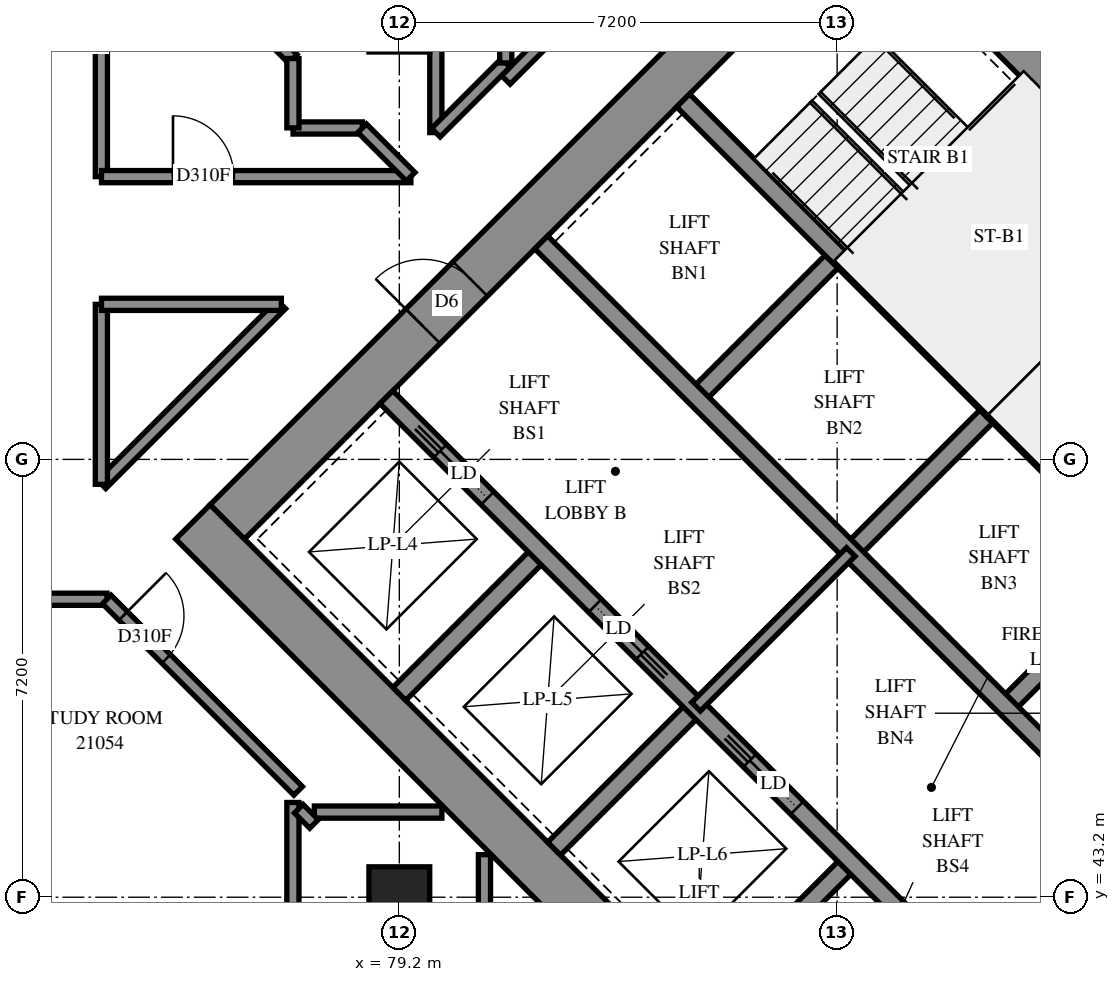
"""IFC4 building model, lengths in metres.
Left out: names, types, materials, properties, quantities, classifications, styles, units other than length and angle.
Written with IfcOpenShell. Run it as: python <this file> out.ifc"""

import sys

from ifc_helpers import new_model, si_unit, direction, frame, frame_2d, origin, origin_2d, place, context, subcontext, project, spatial, rectangle, extrude, element, fill, save


model = new_model("IFC4")
c1 = context("Model", 3, precision=1e-05, world=origin(), true_north=direction((0.0, 1.0)))
c2 = subcontext(c1, "Body", "Model", "MODEL_VIEW")
j1 = project(units=[si_unit("LENGTHUNIT", "METRE"), si_unit("PLANEANGLEUNIT", "RADIAN")], contexts=[c1])
p1 = place(None, origin())
s1 = spatial("IfcSite", under=j1, at=p1, CompositionType="ELEMENT")
p2 = place(p1, origin())
s2 = spatial("IfcBuilding", under=s1, at=p2, CompositionType="ELEMENT")
p3 = place(p2, frame((0.0, 0.0, 81.2)))
s3 = spatial("IfcBuildingStorey", under=s2, at=p3, CompositionType="ELEMENT", Elevation=81.2)
p4 = place(p3, frame((79.2, 43.2, 0.0), z_axis=(0.0, 0.0, 1.0), x_axis=(1.0, 0.0, 0.0)))
e1 = element("IfcColumn", 1, at=p4, inside=s3, PredefinedType="COLUMN", context=c2, shape_type="SweptSolid", body=[
    extrude(rectangle(XDim=1.0, YDim=1.0, at=origin_2d()), origin(), (0.0, 0.0, 1.0), 3.1),
])
p5 = place(p3, frame((75.806, 49.373, -0.3), z_axis=(0.0, 0.0, 1.0), x_axis=(0.7071067812, -0.7071067812, 0.0)))
e2 = element("IfcWall", 2, at=p5, inside=s3, PredefinedType="SHEAR", context=c2, shape_type="SweptSolid", body=[
    extrude(rectangle(XDim=16.0, YDim=0.8, at=frame_2d((8.0, 0.0))), origin(), (0.0, 0.0, 1.0), 2.7),
])
p6 = place(p3, frame((86.554, 60.121, -0.3), z_axis=(0.0, 0.0, 1.0), x_axis=(0.7071067812, -0.7071067812, 0.0)))
e3 = element("IfcWall", 3, at=p6, inside=s3, PredefinedType="SHEAR", context=c2, shape_type="SweptSolid", body=[
    extrude(rectangle(XDim=16.0, YDim=0.8, at=frame_2d((8.0, 0.0))), origin(), (0.0, 0.0, 1.0), 2.7),
])
p7 = place(p6, frame((10.8, 0.0, 0.3)))
e4 = element("IfcOpeningElement", 4, at=p7, cuts=e3, PredefinedType="OPENING", context=c2, shape_type="SweptSolid", body=[
    extrude(rectangle(XDim=0.8, YDim=2.1, at=frame_2d((0.4, 1.05))), frame((0.0, 0.41, 0.0), z_axis=(0.0, -1.0, 0.0), x_axis=(1.0, 0.0, 0.0)), (0.0, 0.0, 1.0), 0.82),
])
p8 = place(p3, frame((76.372, 49.373, -0.3), z_axis=(0.0, 0.0, 1.0), x_axis=(0.7071067812, 0.7071067812, 0.0)))
e5 = element("IfcWall", 5, at=p8, inside=s3, PredefinedType="SHEAR", context=c2, shape_type="SweptSolid", body=[
    extrude(rectangle(XDim=14.4, YDim=0.8, at=frame_2d((7.2, 0.0))), origin(), (0.0, 0.0, 1.0), 2.7),
])
p9 = place(p8, frame((4.55, 0.0, 0.3)))
e6 = element("IfcOpeningElement", 6, at=p9, cuts=e5, PredefinedType="OPENING", context=c2, shape_type="SweptSolid", body=[
    extrude(rectangle(XDim=1.1, YDim=2.1, at=frame_2d((0.55, 1.05))), frame((0.0, 0.41, 0.0), z_axis=(0.0, -1.0, 0.0), x_axis=(1.0, 0.0, 0.0)), (0.0, 0.0, 1.0), 0.82),
])
p10 = place(p8, frame((11.35, 0.0, 0.3)))
e7 = element("IfcOpeningElement", 7, at=p10, cuts=e5, PredefinedType="OPENING", context=c2, shape_type="SweptSolid", body=[
    extrude(rectangle(XDim=1.1, YDim=2.1, at=frame_2d((0.55, 1.05))), frame((0.0, 0.41, 0.0), z_axis=(0.0, -1.0, 0.0), x_axis=(1.0, 0.0, 0.0)), (0.0, 0.0, 1.0), 0.82),
])
p11 = place(p3, frame((87.12, 38.625, -0.3), z_axis=(0.0, 0.0, 1.0), x_axis=(0.7071067812, 0.7071067812, 0.0)))
e8 = element("IfcWall", 8, at=p11, inside=s3, PredefinedType="SHEAR", context=c2, shape_type="SweptSolid", body=[
    extrude(rectangle(XDim=14.4, YDim=0.8, at=frame_2d((7.2, 0.0))), origin(), (0.0, 0.0, 1.0), 2.7),
])
p12 = place(p11, frame((4.55, 0.0, 0.3)))
e9 = element("IfcOpeningElement", 9, at=p12, cuts=e8, PredefinedType="OPENING", context=c2, shape_type="SweptSolid", body=[
    extrude(rectangle(XDim=1.1, YDim=2.1, at=frame_2d((0.55, 1.05))), frame((0.0, 0.41, 0.0), z_axis=(0.0, -1.0, 0.0), x_axis=(1.0, 0.0, 0.0)), (0.0, 0.0, 1.0), 0.82),
])
p13 = place(p11, frame((11.35, 0.0, 0.3)))
e10 = element("IfcOpeningElement", 10, at=p13, cuts=e8, PredefinedType="OPENING", context=c2, shape_type="SweptSolid", body=[
    extrude(rectangle(XDim=1.1, YDim=2.1, at=frame_2d((0.55, 1.05))), frame((0.0, 0.41, 0.0), z_axis=(0.0, -1.0, 0.0), x_axis=(1.0, 0.0, 0.0)), (0.0, 0.0, 1.0), 0.82),
])
for number, where, z_axis, x_axis in (
    (11, (79.2, 46.544, 0.0), (0.0, 0.0, 1.0), (0.707, 0.707, 0.0)),
    (12, (84.079, 51.423, 0.0), (0.0, 0.0, 1.0), (0.707, 0.707, 0.0)),
):
    element("IfcWall", number, at=place(p3, frame(where, z_axis=z_axis, x_axis=x_axis)), inside=s3, PredefinedType="SOLIDWALL", context=c2, shape_type="SweptSolid", body=[
        extrude(rectangle(XDim=3.3, YDim=0.3, at=frame_2d((1.65, 0.0))), origin(), (0.0, 0.0, 1.0), 3.1),
    ])
p14 = place(p3, frame((81.746, 43.999, 0.0), z_axis=(0.0, 0.0, 1.0), x_axis=(0.7071067812, 0.7071067812, 0.0)))
e13 = element("IfcWall", 13, at=p14, inside=s3, PredefinedType="SOLIDWALL", context=c2, shape_type="SweptSolid", body=[
    extrude(rectangle(XDim=3.3, YDim=0.3, at=frame_2d((1.65, 0.0))), origin(), (0.0, 0.0, 1.0), 3.1),
])
p15 = place(p3, frame((86.625, 48.878, 0.0), z_axis=(0.0, 0.0, 1.0), x_axis=(0.7071067812, 0.7071067812, 0.0)))
e14 = element("IfcWall", 14, at=p15, inside=s3, PredefinedType="SOLIDWALL", context=c2, shape_type="SweptSolid", body=[
    extrude(rectangle(XDim=3.3, YDim=0.3, at=frame_2d((1.65, 0.0))), origin(), (0.0, 0.0, 1.0), 3.1),
])
p16 = place(p3, frame((84.291, 41.453, 0.0), z_axis=(0.0, 0.0, 1.0), x_axis=(0.7071067812, 0.7071067812, 0.0)))
e15 = element("IfcWall", 15, at=p16, inside=s3, PredefinedType="SOLIDWALL", context=c2, shape_type="SweptSolid", body=[
    extrude(rectangle(XDim=3.3, YDim=0.3, at=frame_2d((1.65, 0.0))), origin(), (0.0, 0.0, 1.0), 3.1),
])
p17 = place(p3, frame((89.17, 46.332, 0.0), z_axis=(0.0, 0.0, 1.0), x_axis=(0.7071067812, 0.7071067812, 0.0)))
e16 = element("IfcWall", 16, at=p17, inside=s3, PredefinedType="SOLIDWALL", context=c2, shape_type="SweptSolid", body=[
    extrude(rectangle(XDim=3.3, YDim=0.3, at=frame_2d((1.65, 0.0))), origin(), (0.0, 0.0, 1.0), 3.1),
])
p18 = place(p3, frame((78.988, 51.423, 0.0), z_axis=(0.0, 0.0, 1.0), x_axis=(0.7071067812, -0.7071067812, 0.0)))
e17 = element("IfcWall", 17, at=p18, inside=s3, PredefinedType="SOLIDWALL", context=c2, shape_type="SweptSolid", body=[
    extrude(rectangle(XDim=14.4, YDim=0.3, at=frame_2d((7.2, 0.0))), origin(), (0.0, 0.0, 1.0), 3.1),
])
p19 = place(p18, frame((1.25, 0.0, 0.0)))
e18 = element("IfcOpeningElement", 18, at=p19, cuts=e17, PredefinedType="OPENING", context=c2, shape_type="SweptSolid", body=[
    extrude(rectangle(XDim=1.1, YDim=2.1, at=frame_2d((0.55, 1.05))), frame((0.0, 0.16, 0.0), z_axis=(0.0, -1.0, 0.0), x_axis=(1.0, 0.0, 0.0)), (0.0, 0.0, 1.0), 0.32),
])
p20 = place(p18, frame((4.85, 0.0, 0.0)))
e19 = element("IfcOpeningElement", 19, at=p20, cuts=e17, PredefinedType="OPENING", context=c2, shape_type="SweptSolid", body=[
    extrude(rectangle(XDim=1.1, YDim=2.1, at=frame_2d((0.55, 1.05))), frame((0.0, 0.16, 0.0), z_axis=(0.0, -1.0, 0.0), x_axis=(1.0, 0.0, 0.0)), (0.0, 0.0, 1.0), 0.32),
])
p21 = place(p18, frame((8.45, 0.0, 0.0)))
e20 = element("IfcOpeningElement", 20, at=p21, cuts=e17, PredefinedType="OPENING", context=c2, shape_type="SweptSolid", body=[
    extrude(rectangle(XDim=1.1, YDim=2.1, at=frame_2d((0.55, 1.05))), frame((0.0, 0.16, 0.0), z_axis=(0.0, -1.0, 0.0), x_axis=(1.0, 0.0, 0.0)), (0.0, 0.0, 1.0), 0.32),
])
p22 = place(p18, frame((12.05, 0.0, 0.0)))
e21 = element("IfcOpeningElement", 21, at=p22, cuts=e17, PredefinedType="OPENING", context=c2, shape_type="SweptSolid", body=[
    extrude(rectangle(XDim=1.1, YDim=2.1, at=frame_2d((0.55, 1.05))), frame((0.0, 0.16, 0.0), z_axis=(0.0, -1.0, 0.0), x_axis=(1.0, 0.0, 0.0)), (0.0, 0.0, 1.0), 0.32),
])
p23 = place(p3, frame((81.534, 53.969, 0.0), z_axis=(0.0, 0.0, 1.0), x_axis=(0.707103309, -0.7071102534, 0.0)))
e22 = element("IfcWall", 22, at=p23, inside=s3, PredefinedType="SOLIDWALL", context=c2, shape_type="SweptSolid", body=[
    extrude(rectangle(XDim=14.4, YDim=0.3, at=frame_2d((7.2, 0.0))), origin(), (0.0, 0.0, 1.0), 3.1),
])
p24 = place(p23, frame((12.05, 0.0, 0.0)))
e23 = element("IfcOpeningElement", 23, at=p24, cuts=e22, PredefinedType="OPENING", context=c2, shape_type="SweptSolid", body=[
    extrude(rectangle(XDim=1.1, YDim=2.1, at=frame_2d((0.55, 1.05))), frame((0.0, 0.16, 0.0), z_axis=(0.0, -1.0, 0.0), x_axis=(1.0, 0.0, 0.0)), (0.0, 0.0, 1.0), 0.32),
])
for number, where, z_axis, x_axis in (
    (24, (83.867, 56.302, 0.0), (0.0, 0.0, 1.0), (0.707, -0.707, 0.0)),
    (25, (88.958, 51.211, 0.0), (0.0, 0.0, 1.0), (0.707, -0.707, 0.0)),
):
    element("IfcWall", number, at=place(p3, frame(where, z_axis=z_axis, x_axis=x_axis)), inside=s3, PredefinedType="SOLIDWALL", context=c2, shape_type="SweptSolid", body=[
        extrude(rectangle(XDim=7.2, YDim=0.3, at=frame_2d((3.6, 0.0))), origin(), (0.0, 0.0, 1.0), 3.1),
    ])
p25 = place(p3, frame((88.958, 51.211, 0.0), z_axis=(0.0, 0.0, 1.0), x_axis=(0.7071067812, 0.7071067812, 0.0)))
e26 = element("IfcWall", 26, at=p25, inside=s3, PredefinedType="SOLIDWALL", context=c2, shape_type="SweptSolid", body=[
    extrude(rectangle(XDim=4.2, YDim=0.3, at=frame_2d((2.1, 0.0))), origin(), (0.0, 0.0, 1.0), 3.1),
])
p26 = place(p3, frame((84.079, 46.332, 0.0), z_axis=(0.0, 0.0, 1.0), x_axis=(0.7071067812, 0.7071067812, 0.0)))
e27 = element("IfcWall", 27, at=p26, inside=s3, PredefinedType="PARTITIONING", context=c2, shape_type="SweptSolid", body=[
    extrude(rectangle(XDim=3.6, YDim=0.2, at=frame_2d((1.8, 0.0))), origin(), (0.0, 0.0, 1.0), 3.1),
])
p27 = place(p3, frame((55.3, 48.1, 0.0), z_axis=(0.0, 0.0, 1.0), x_axis=(1.0, 0.0, 0.0)))
e28 = element("IfcWall", 28, at=p27, inside=s3, PredefinedType="PARTITIONING", context=c2, shape_type="SweptSolid", body=[
    extrude(rectangle(XDim=19.092, YDim=0.2, at=frame_2d((9.546, 0.0))), origin(), (0.0, 0.0, 1.0), 3.1),
])
p28 = place(p27, frame((6.199, 0.0, 0.0)))
e29 = element("IfcOpeningElement", 29, at=p28, cuts=e28, PredefinedType="OPENING", context=c2, shape_type="SweptSolid", body=[
    extrude(rectangle(XDim=0.9, YDim=2.1, at=frame_2d((0.45, 1.05))), frame((0.0, 0.11, 0.0), z_axis=(0.0, -1.0, 0.0), x_axis=(1.0, 0.0, 0.0)), (0.0, 0.0, 1.0), 0.22),
])
p29 = place(p27, frame((13.363, 0.0, 0.0)))
e30 = element("IfcOpeningElement", 30, at=p29, cuts=e28, PredefinedType="OPENING", context=c2, shape_type="SweptSolid", body=[
    extrude(rectangle(XDim=1.0, YDim=2.1, at=frame_2d((0.5, 1.05))), frame((0.0, 0.11, 0.0), z_axis=(0.0, -1.0, 0.0), x_axis=(1.0, 0.0, 0.0)), (0.0, 0.0, 1.0), 0.22),
])
p30 = place(p3, frame((87.894, 61.461, 0.0), z_axis=(0.0, 0.0, 1.0), x_axis=(0.7071067812, -0.7071067812, 0.0)))
e31 = element("IfcWall", 31, at=p30, inside=s3, PredefinedType="PARTITIONING", context=c2, shape_type="SweptSolid", body=[
    extrude(rectangle(XDim=17.5, YDim=0.2, at=frame_2d((8.75, 0.0))), origin(), (0.0, 0.0, 1.0), 3.1),
])
p31 = place(p30, frame((8.735, 0.0, 0.0)))
e32 = element("IfcOpeningElement", 32, at=p31, cuts=e31, PredefinedType="OPENING", context=c2, shape_type="SweptSolid", body=[
    extrude(rectangle(XDim=0.9, YDim=2.1, at=frame_2d((0.45, 1.05))), frame((0.0, 0.11, 0.0), z_axis=(0.0, -1.0, 0.0), x_axis=(1.0, 0.0, 0.0)), (0.0, 0.0, 1.0), 0.22),
])
p32 = place(p3, frame((80.951, 56.641, 0.0), z_axis=(0.0, 0.0, 1.0), x_axis=(0.7071067812, 0.7071067812, 0.0)))
e33 = element("IfcWall", 33, at=p32, inside=s3, PredefinedType="PARTITIONING", context=c2, shape_type="SweptSolid", body=[
    extrude(rectangle(XDim=8.321, YDim=0.2, at=frame_2d((4.161, 0.0))), origin(), (0.0, 0.0, 1.0), 3.1),
])
p33 = place(p32, frame((0.816, 0.0, 0.0)))
e34 = element("IfcOpeningElement", 34, at=p33, cuts=e33, PredefinedType="OPENING", context=c2, shape_type="SweptSolid", body=[
    extrude(rectangle(XDim=1.0, YDim=2.1, at=frame_2d((0.5, 1.05))), frame((0.0, 0.11, 0.0), z_axis=(0.0, -1.0, 0.0), x_axis=(1.0, 0.0, 0.0)), (0.0, 0.0, 1.0), 0.22),
])
p34 = place(p3, frame((74.3, 55.05, 0.0), z_axis=(0.0, 0.0, 1.0), x_axis=(0.0, 1.0, 0.0)))
e35 = element("IfcWall", 35, at=p34, inside=s3, PredefinedType="PARTITIONING", context=c2, shape_type="SweptSolid", body=[
    extrude(rectangle(XDim=5.09, YDim=0.2, at=frame_2d((2.545, 0.0))), origin(), (0.0, 0.0, 1.0), 3.1),
])
p35 = place(p3, frame((74.302, 55.05, 0.0), z_axis=(0.0, 0.0, 1.0), x_axis=(1.0, 0.0, 0.0)))
e36 = element("IfcWall", 36, at=p35, inside=s3, PredefinedType="PARTITIONING", context=c2, shape_type="SweptSolid", body=[
    extrude(rectangle(XDim=5.088, YDim=0.2, at=frame_2d((2.544, 0.0))), origin(), (0.0, 0.0, 1.0), 3.1),
])
p36 = place(p35, frame((1.176, 0.0, 0.0)))
e37 = element("IfcOpeningElement", 37, at=p36, cuts=e36, PredefinedType="OPENING", context=c2, shape_type="SweptSolid", body=[
    extrude(rectangle(XDim=1.0, YDim=2.1, at=frame_2d((0.5, 1.05))), frame((0.0, 0.11, 0.0), z_axis=(0.0, -1.0, 0.0), x_axis=(1.0, 0.0, 0.0)), (0.0, 0.0, 1.0), 0.22),
])
p37 = place(p3, frame((74.388, 48.096, 0.0), z_axis=(0.0, 0.0, 1.0), x_axis=(0.7071067812, -0.7071067812, 0.0)))
e38 = element("IfcWall", 38, at=p37, inside=s3, PredefinedType="PARTITIONING", context=c2, shape_type="SweptSolid", body=[
    extrude(rectangle(XDim=4.452, YDim=0.2, at=frame_2d((2.226, 0.0))), origin(), (0.0, 0.0, 1.0), 3.1),
])
p38 = place(p37, frame((0.382, 0.0, 0.0)))
e39 = element("IfcOpeningElement", 39, at=p38, cuts=e38, PredefinedType="OPENING", context=c2, shape_type="SweptSolid", body=[
    extrude(rectangle(XDim=1.0, YDim=2.1, at=frame_2d((0.5, 1.05))), frame((0.0, 0.11, 0.0), z_axis=(0.0, -1.0, 0.0), x_axis=(1.0, 0.0, 0.0)), (0.0, 0.0, 1.0), 0.22),
])
p39 = place(p3, frame((74.299, 60.137, 0.0), z_axis=(0.0, 0.0, 1.0), x_axis=(0.7071067812, -0.7071067812, 0.0)))
e40 = element("IfcWall", 40, at=p39, inside=s3, PredefinedType="PARTITIONING", context=c2, shape_type="SweptSolid", body=[
    extrude(rectangle(XDim=4.452, YDim=0.2, at=frame_2d((2.226, 0.0))), origin(), (0.0, 0.0, 1.0), 3.1),
])
p40 = place(p3, frame((74.301, 49.991, 0.0), z_axis=(0.0, 0.0, 1.0), x_axis=(0.7071067812, 0.7071067812, 0.0)))
e41 = element("IfcWall", 41, at=p40, inside=s3, PredefinedType="PARTITIONING", context=c2, shape_type="SweptSolid", body=[
    extrude(rectangle(XDim=4.183, YDim=0.2, at=frame_2d((2.092, 0.0))), origin(), (0.0, 0.0, 1.0), 3.1),
])
p41 = place(p3, frame((79.8, 55.774, 0.0), z_axis=(0.0, 0.0, 1.0), x_axis=(0.0, 1.0, 0.0)))
e42 = element("IfcWall", 42, at=p41, inside=s3, PredefinedType="PARTITIONING", context=c2, shape_type="SweptSolid", body=[
    extrude(rectangle(XDim=3.576, YDim=0.2, at=frame_2d((1.788, 0.0))), origin(), (0.0, 0.0, 1.0), 3.1),
])
p42 = place(p3, frame((77.45, 41.205, 0.0), z_axis=(0.0, 0.0, 1.0), x_axis=(0.0, 1.0, 0.0)))
e43 = element("IfcWall", 43, at=p42, inside=s3, PredefinedType="PARTITIONING", context=c2, shape_type="SweptSolid", body=[
    extrude(rectangle(XDim=3.553, YDim=0.2, at=frame_2d((1.777, 0.0))), origin(), (0.0, 0.0, 1.0), 3.1),
])
p43 = place(p3, frame((74.3, 49.99, 0.0), z_axis=(0.0, 0.0, 1.0), x_axis=(0.0, 1.0, 0.0)))
e44 = element("IfcWall", 44, at=p43, inside=s3, PredefinedType="PARTITIONING", context=c2, shape_type="SweptSolid", body=[
    extrude(rectangle(XDim=2.96, YDim=0.2, at=frame_2d((1.48, 0.0))), origin(), (0.0, 0.0, 1.0), 3.1),
])
p44 = place(p3, frame((74.302, 52.95, 0.0), z_axis=(0.0, 0.0, 1.0), x_axis=(1.0, 0.0, 0.0)))
e45 = element("IfcWall", 45, at=p44, inside=s3, PredefinedType="PARTITIONING", context=c2, shape_type="SweptSolid", body=[
    extrude(rectangle(XDim=2.958, YDim=0.2, at=frame_2d((1.479, 0.0))), origin(), (0.0, 0.0, 1.0), 3.1),
])
for number, where, z_axis, x_axis in (
    (46, (77.802, 44.6, 0.0), (0.0, 0.0, 1.0), (1.0, 0.0, 0.0)),
    (47, (80.6, 41.802, 0.0), (0.0, 0.0, 1.0), (0.0, 1.0, 0.0)),
):
    element("IfcWall", number, at=place(p3, frame(where, z_axis=z_axis, x_axis=x_axis)), inside=s3, PredefinedType="PARTITIONING", context=c2, shape_type="SweptSolid", body=[
        extrude(rectangle(XDim=2.098, YDim=0.2, at=frame_2d((1.049, 0.0))), origin(), (0.0, 0.0, 1.0), 3.1),
    ])
p45 = place(p3, frame((79.801, 55.773, 0.0), z_axis=(0.0, 0.0, 1.0), x_axis=(0.7071067812, 0.7071067812, 0.0)))
e48 = element("IfcWall", 48, at=p45, inside=s3, PredefinedType="PARTITIONING", context=c2, shape_type="SweptSolid", body=[
    extrude(rectangle(XDim=1.623, YDim=0.2, at=frame_2d((0.812, 0.0))), origin(), (0.0, 0.0, 1.0), 3.1),
])
p46 = place(p3, frame((80.95, 56.92, 0.0), z_axis=(0.0, 0.0, 1.0), x_axis=(0.0, 1.0, 0.0)))
e49 = element("IfcWall", 49, at=p46, inside=s3, PredefinedType="PARTITIONING", context=c2, shape_type="SweptSolid", body=[
    extrude(rectangle(XDim=1.556, YDim=0.2, at=frame_2d((0.778, 0.0))), origin(), (0.0, 0.0, 1.0), 3.1),
])
for number, where, z_axis, x_axis in (
    (50, (77.452, 55.85, 0.0), (0.0, 0.0, 1.0), (1.0, 0.0, 0.0)),
    (51, (77.45, 55.852, 0.0), (0.0, 0.0, 1.0), (0.0, 1.0, 0.0)),
):
    element("IfcWall", number, at=place(p3, frame(where, z_axis=z_axis, x_axis=x_axis)), inside=s3, PredefinedType="PARTITIONING", context=c2, shape_type="SweptSolid", body=[
        extrude(rectangle(XDim=1.14, YDim=0.2, at=frame_2d((0.57, 0.0))), origin(), (0.0, 0.0, 1.0), 3.1),
    ])
p47 = place(p3, frame((78.589, 55.847, 0.0), z_axis=(0.0, 0.0, 1.0), x_axis=(0.7071067812, -0.7071067812, 0.0)))
e52 = element("IfcWall", 52, at=p47, inside=s3, PredefinedType="PARTITIONING", context=c2, shape_type="SweptSolid", body=[
    extrude(rectangle(XDim=1.129, YDim=0.2, at=frame_2d((0.564, 0.0))), origin(), (0.0, 0.0, 1.0), 3.1),
])
p48 = place(p3, frame((77.546, 44.656, 0.0), z_axis=(0.0, 0.0, 1.0), x_axis=(0.7071067812, -0.7071067812, 0.0)))
e53 = element("IfcWall", 53, at=p48, inside=s3, PredefinedType="PARTITIONING", context=c2, shape_type="SweptSolid", body=[
    extrude(rectangle(XDim=0.355, YDim=0.2, at=frame_2d((0.177, 0.0))), origin(), (0.0, 0.0, 1.0), 3.1),
])
p49 = place(p9, origin())
e54 = element("IfcDoor", 54, at=p49, inside=s3, OperationType="DOUBLE_DOOR_SINGLE_SWING", PredefinedType="DOOR", context=c2, shape_type="SweptSolid", body=[
    extrude(rectangle(XDim=1.1, YDim=2.1, at=frame_2d((0.55, 1.05))), frame((0.0, 0.025, 0.0), z_axis=(0.0, -1.0, 0.0), x_axis=(1.0, 0.0, 0.0)), (0.0, 0.0, 1.0), 0.05),
])
fill(e6, e54)
p50 = place(p19, origin())
e55 = element("IfcDoor", 55, at=p50, inside=s3, OperationType="SLIDING_TO_LEFT", PredefinedType="DOOR", context=c2, shape_type="SweptSolid", body=[
    extrude(rectangle(XDim=1.1, YDim=2.1, at=frame_2d((0.55, 1.05))), frame((0.0, 0.025, 0.0), z_axis=(0.0, -1.0, 0.0), x_axis=(1.0, 0.0, 0.0)), (0.0, 0.0, 1.0), 0.05),
])
fill(e18, e55)
p51 = place(p20, origin())
e56 = element("IfcDoor", 56, at=p51, inside=s3, OperationType="SLIDING_TO_RIGHT", PredefinedType="DOOR", context=c2, shape_type="SweptSolid", body=[
    extrude(rectangle(XDim=1.1, YDim=2.1, at=frame_2d((0.55, 1.05))), frame((0.0, 0.025, 0.0), z_axis=(0.0, -1.0, 0.0), x_axis=(1.0, 0.0, 0.0)), (0.0, 0.0, 1.0), 0.05),
])
fill(e19, e56)
p52 = place(p21, origin())
e57 = element("IfcDoor", 57, at=p52, inside=s3, OperationType="SLIDING_TO_LEFT", PredefinedType="DOOR", context=c2, shape_type="SweptSolid", body=[
    extrude(rectangle(XDim=1.1, YDim=2.1, at=frame_2d((0.55, 1.05))), frame((0.0, 0.025, 0.0), z_axis=(0.0, -1.0, 0.0), x_axis=(1.0, 0.0, 0.0)), (0.0, 0.0, 1.0), 0.05),
])
fill(e20, e57)
p53 = place(p36, origin())
e58 = element("IfcDoor", 58, at=p53, inside=s3, OperationType="SINGLE_SWING_LEFT", PredefinedType="DOOR", context=c2, shape_type="SweptSolid", body=[
    extrude(rectangle(XDim=1.0, YDim=2.1, at=frame_2d((0.5, 1.05))), frame((0.0, 0.025, 0.0), z_axis=(0.0, -1.0, 0.0), x_axis=(1.0, 0.0, 0.0)), (0.0, 0.0, 1.0), 0.05),
])
fill(e37, e58)
p54 = place(p38, origin())
e59 = element("IfcDoor", 59, at=p54, inside=s3, OperationType="SINGLE_SWING_LEFT", PredefinedType="DOOR", context=c2, shape_type="SweptSolid", body=[
    extrude(rectangle(XDim=1.0, YDim=2.1, at=frame_2d((0.5, 1.05))), frame((0.0, 0.025, 0.0), z_axis=(0.0, -1.0, 0.0), x_axis=(1.0, 0.0, 0.0)), (0.0, 0.0, 1.0), 0.05),
])
fill(e39, e59)
save(model, sys.argv[1])
